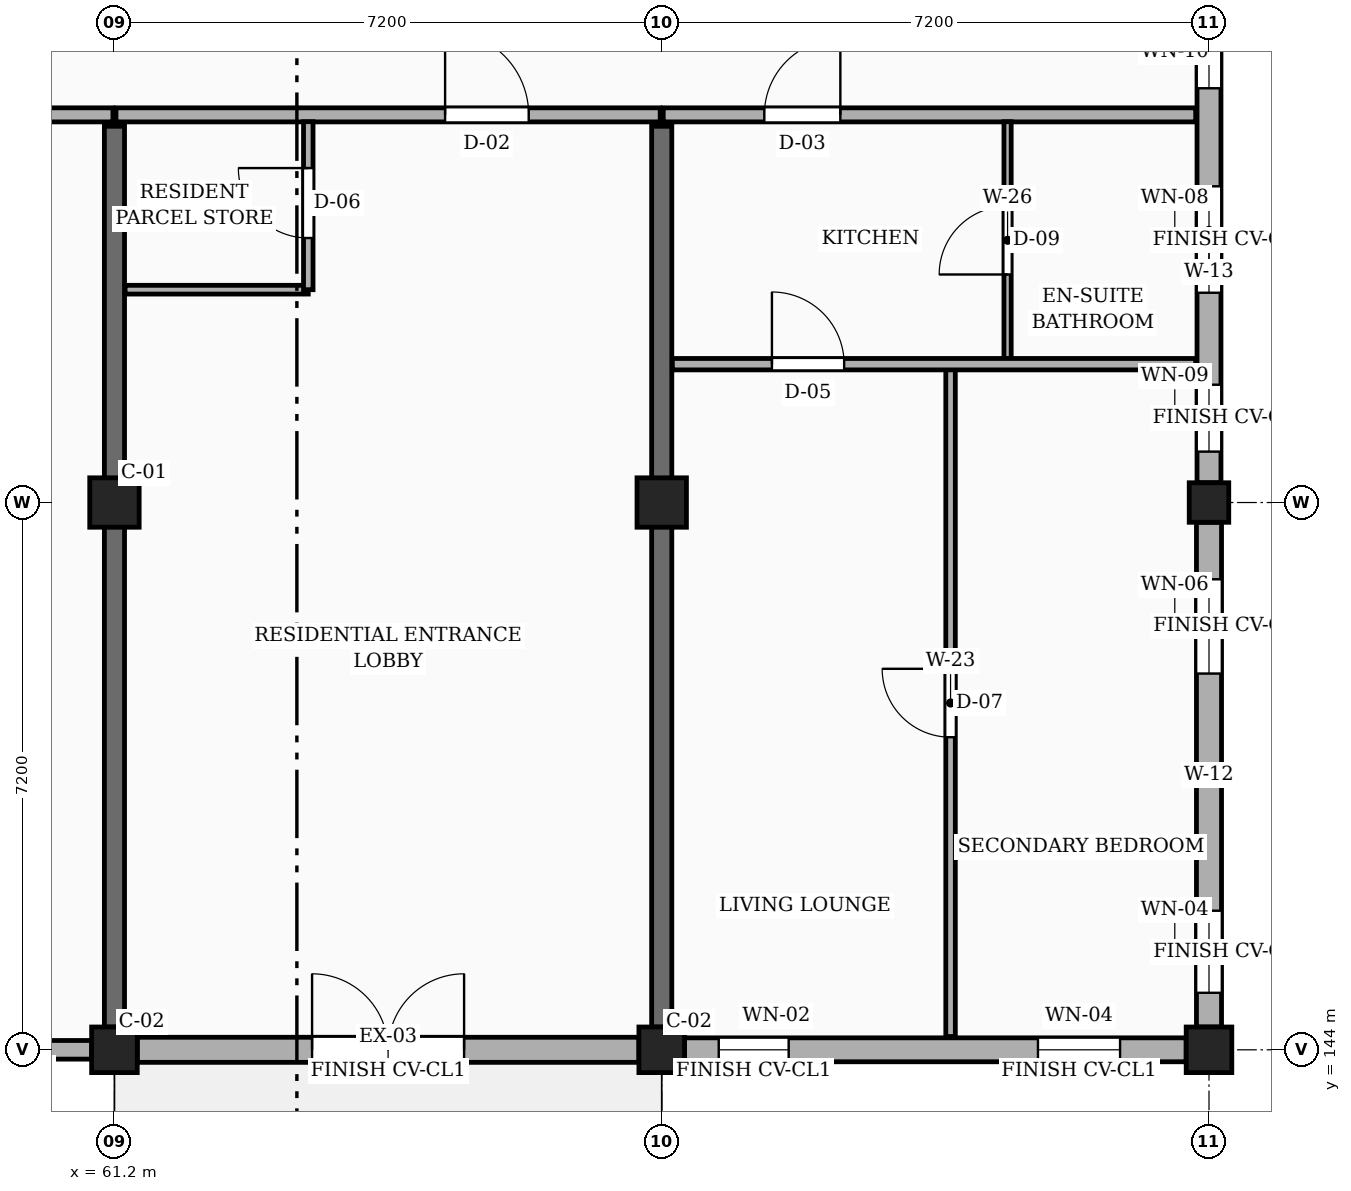
"""IFC4 building model, lengths in metres.
Left out: names, types, materials, properties, quantities, classifications, styles, units other than length and angle.
Written with IfcOpenShell. Run it as: python <this file> out.ifc"""

import sys

from ifc_helpers import new_model, si_unit, direction, frame, frame_2d, origin, origin_2d, place, context, subcontext, project, spatial, rectangle, circle, extrude, element, fill, save


model = new_model("IFC4")
c1 = context("Model", 3, precision=1e-05, world=origin(), true_north=direction((0.0, 1.0)))
c2 = subcontext(c1, "Body", "Model", "MODEL_VIEW")
j1 = project(units=[si_unit("LENGTHUNIT", "METRE"), si_unit("PLANEANGLEUNIT", "RADIAN")], contexts=[c1])
p1 = place(None, origin())
s1 = spatial("IfcSite", under=j1, at=p1, CompositionType="ELEMENT")
p2 = place(p1, origin())
s2 = spatial("IfcBuilding", under=s1, at=p2, CompositionType="ELEMENT")
p3 = place(p2, origin())
s3 = spatial("IfcBuildingStorey", under=s2, at=p3, CompositionType="ELEMENT", Elevation=0.0)
p4 = place(p3, frame((61.2, 144.0, 0.0), z_axis=(0.0, 0.0, 1.0), x_axis=(1.0, 0.0, 0.0)))
e1 = element("IfcColumn", 1, at=p4, inside=s3, PredefinedType="COLUMN", context=c2, shape_type="SweptSolid", body=[
    extrude(rectangle(XDim=0.6, YDim=0.6, at=origin_2d()), origin(), (0.0, 0.0, 1.0), 4.5),
])
p5 = place(p3, frame((61.2, 151.2, 0.0), z_axis=(0.0, 0.0, 1.0), x_axis=(1.0, 0.0, 0.0)))
e2 = element("IfcColumn", 2, at=p5, inside=s3, PredefinedType="COLUMN", context=c2, shape_type="SweptSolid", body=[
    extrude(rectangle(XDim=0.65, YDim=0.65, at=origin_2d()), origin(), (0.0, 0.0, 1.0), 4.5),
])
p6 = place(p3, frame((68.4, 144.0, 0.0), z_axis=(0.0, 0.0, 1.0), x_axis=(1.0, 0.0, 0.0)))
e3 = element("IfcColumn", 3, at=p6, inside=s3, PredefinedType="COLUMN", context=c2, shape_type="SweptSolid", body=[
    extrude(rectangle(XDim=0.6, YDim=0.6, at=origin_2d()), origin(), (0.0, 0.0, 1.0), 4.5),
])
p7 = place(p3, frame((68.4, 151.2, 0.0), z_axis=(0.0, 0.0, 1.0), x_axis=(1.0, 0.0, 0.0)))
e4 = element("IfcColumn", 4, at=p7, inside=s3, PredefinedType="COLUMN", context=c2, shape_type="SweptSolid", body=[
    extrude(rectangle(XDim=0.65, YDim=0.65, at=origin_2d()), origin(), (0.0, 0.0, 1.0), 4.5),
])
p8 = place(p3, frame((75.6, 144.0, 0.0), z_axis=(0.0, 0.0, 1.0), x_axis=(1.0, 0.0, 0.0)))
e5 = element("IfcColumn", 5, at=p8, inside=s3, PredefinedType="COLUMN", context=c2, shape_type="SweptSolid", body=[
    extrude(rectangle(XDim=0.6, YDim=0.6, at=origin_2d()), origin(), (0.0, 0.0, 1.0), 4.5),
])
p9 = place(p3, frame((75.6, 151.2, 0.0), z_axis=(0.0, 0.0, 1.0), x_axis=(1.0, 0.0, 0.0)))
e6 = element("IfcColumn", 6, at=p9, inside=s3, PredefinedType="COLUMN", context=c2, shape_type="SweptSolid", body=[
    extrude(circle(Radius=0.26, at=origin_2d()), origin(), (0.0, 0.0, 1.0), 4.5),
])
for number, where, z_axis, x_axis in (
    (7, (61.2, 144.3, 0.0), (0.0, 0.0, 1.0), (0.0, 1.0, 0.0)),
    (8, (68.4, 144.3, 0.0), (0.0, 0.0, 1.0), (0.0, 1.0, 0.0)),
):
    element("IfcWall", number, at=place(p3, frame(where, z_axis=z_axis, x_axis=x_axis)), inside=s3, PredefinedType="SOLIDWALL", context=c2, shape_type="SweptSolid", body=[
        extrude(rectangle(XDim=11.85, YDim=0.265, at=frame_2d((5.925, 0.0))), origin(), (0.0, 0.0, 1.0), 3.535),
    ])
p10 = place(p3, frame((54.26, 144.0, 0.0), z_axis=(0.0, 0.0, 1.0), x_axis=(1.0, 0.0, 0.0)))
e9 = element("IfcWall", 9, at=p10, inside=s3, PredefinedType="SOLIDWALL", context=c2, shape_type="SweptSolid", body=[
    extrude(rectangle(XDim=6.64, YDim=0.245, at=frame_2d((3.32, 0.0))), origin(), (0.0, 0.0, 1.0), 3.805),
])
p11 = place(p10, frame((0.45, 0.0, 0.78)))
e10 = element("IfcOpeningElement", 10, at=p11, cuts=e9, PredefinedType="OPENING", context=c2, shape_type="SweptSolid", body=[
    extrude(rectangle(XDim=1.45, YDim=1.44, at=frame_2d((0.725, 0.72))), frame((0.0, 0.133, 0.0), z_axis=(0.0, -1.0, 0.0), x_axis=(1.0, 0.0, 0.0)), (0.0, 0.0, 1.0), 0.265),
])
p12 = place(p10, frame((4.65, 0.0, 0.78)))
e11 = element("IfcOpeningElement", 11, at=p12, cuts=e9, PredefinedType="OPENING", context=c2, shape_type="SweptSolid", body=[
    extrude(rectangle(XDim=0.92, YDim=1.15, at=frame_2d((0.46, 0.575))), frame((0.0, 0.133, 0.0), z_axis=(0.0, -1.0, 0.0), x_axis=(1.0, 0.0, 0.0)), (0.0, 0.0, 1.0), 0.265),
])
p13 = place(p3, frame((61.5, 144.0, 0.0), z_axis=(0.0, 0.0, 1.0), x_axis=(1.0, 0.0, 0.0)))
e12 = element("IfcWall", 12, at=p13, inside=s3, PredefinedType="SOLIDWALL", context=c2, shape_type="SweptSolid", body=[
    extrude(rectangle(XDim=6.6, YDim=0.33, at=frame_2d((3.3, 0.0))), origin(), (0.0, 0.0, 1.0), 3.805),
])
p14 = place(p13, frame((2.3, 0.0, 0.0)))
e13 = element("IfcOpeningElement", 13, at=p14, cuts=e12, PredefinedType="OPENING", context=c2, shape_type="SweptSolid", body=[
    extrude(rectangle(XDim=2.0, YDim=2.3, at=frame_2d((1.0, 1.15))), frame((0.0, 0.175, 0.0), z_axis=(0.0, -1.0, 0.0), x_axis=(1.0, 0.0, 0.0)), (0.0, 0.0, 1.0), 0.35),
])
p15 = place(p3, frame((68.7, 144.0, 0.0), z_axis=(0.0, 0.0, 1.0), x_axis=(1.0, 0.0, 0.0)))
e14 = element("IfcWall", 14, at=p15, inside=s3, PredefinedType="SOLIDWALL", context=c2, shape_type="SweptSolid", body=[
    extrude(rectangle(XDim=6.6, YDim=0.315, at=frame_2d((3.3, 0.0))), origin(), (0.0, 0.0, 1.0), 3.805),
])
p16 = place(p15, frame((0.45, 0.0, 0.78)))
e15 = element("IfcOpeningElement", 15, at=p16, cuts=e14, PredefinedType="OPENING", context=c2, shape_type="SweptSolid", body=[
    extrude(rectangle(XDim=0.92, YDim=1.15, at=frame_2d((0.46, 0.575))), frame((0.0, 0.167, 0.0), z_axis=(0.0, -1.0, 0.0), x_axis=(1.0, 0.0, 0.0)), (0.0, 0.0, 1.0), 0.335),
])
p17 = place(p15, frame((4.65, 0.0, 0.78)))
e16 = element("IfcOpeningElement", 16, at=p17, cuts=e14, PredefinedType="OPENING", context=c2, shape_type="SweptSolid", body=[
    extrude(rectangle(XDim=1.08, YDim=1.15, at=frame_2d((0.54, 0.575))), frame((0.0, 0.167, 0.0), z_axis=(0.0, -1.0, 0.0), x_axis=(1.0, 0.0, 0.0)), (0.0, 0.0, 1.0), 0.335),
])
p18 = place(p3, frame((75.6, 144.3, 0.0), z_axis=(0.0, 0.0, 1.0), x_axis=(0.0, 1.0, 0.0)))
e17 = element("IfcWall", 17, at=p18, inside=s3, PredefinedType="SOLIDWALL", context=c2, shape_type="SweptSolid", body=[
    extrude(rectangle(XDim=6.64, YDim=0.33, at=frame_2d((3.32, 0.0))), origin(), (0.0, 0.0, 1.0), 3.805),
])
p19 = place(p18, frame((0.45, 0.0, 0.78)))
e18 = element("IfcOpeningElement", 18, at=p19, cuts=e17, PredefinedType="OPENING", context=c2, shape_type="SweptSolid", body=[
    extrude(rectangle(XDim=1.08, YDim=1.15, at=frame_2d((0.54, 0.575))), frame((0.0, 0.175, 0.0), z_axis=(0.0, -1.0, 0.0), x_axis=(1.0, 0.0, 0.0)), (0.0, 0.0, 1.0), 0.35),
])
p20 = place(p18, frame((4.65, 0.0, 0.78)))
e19 = element("IfcOpeningElement", 19, at=p20, cuts=e17, PredefinedType="OPENING", context=c2, shape_type="SweptSolid", body=[
    extrude(rectangle(XDim=1.24, YDim=1.15, at=frame_2d((0.62, 0.575))), frame((0.0, 0.175, 0.0), z_axis=(0.0, -1.0, 0.0), x_axis=(1.0, 0.0, 0.0)), (0.0, 0.0, 1.0), 0.35),
])
p21 = place(p3, frame((75.6, 151.46, 0.0), z_axis=(0.0, 0.0, 1.0), x_axis=(0.0, 1.0, 0.0)))
e20 = element("IfcWall", 20, at=p21, inside=s3, PredefinedType="SOLIDWALL", context=c2, shape_type="SweptSolid", body=[
    extrude(rectangle(XDim=6.64, YDim=0.315, at=frame_2d((3.32, 0.0))), origin(), (0.0, 0.0, 1.0), 3.805),
])
p22 = place(p21, frame((0.41, 0.0, 0.78)))
e21 = element("IfcOpeningElement", 21, at=p22, cuts=e20, PredefinedType="OPENING", context=c2, shape_type="SweptSolid", body=[
    extrude(rectangle(XDim=0.88, YDim=1.26, at=frame_2d((0.44, 0.63))), frame((0.0, 0.167, 0.0), z_axis=(0.0, -1.0, 0.0), x_axis=(1.0, 0.0, 0.0)), (0.0, 0.0, 1.0), 0.335),
])
p23 = place(p21, frame((2.5, 0.0, 0.78)))
e22 = element("IfcOpeningElement", 22, at=p23, cuts=e20, PredefinedType="OPENING", context=c2, shape_type="SweptSolid", body=[
    extrude(rectangle(XDim=1.4, YDim=1.15, at=frame_2d((0.7, 0.575))), frame((0.0, 0.167, 0.0), z_axis=(0.0, -1.0, 0.0), x_axis=(1.0, 0.0, 0.0)), (0.0, 0.0, 1.0), 0.335),
])
p24 = place(p21, frame((5.19, 0.0, 0.78)))
e23 = element("IfcOpeningElement", 23, at=p24, cuts=e20, PredefinedType="OPENING", context=c2, shape_type="SweptSolid", body=[
    extrude(rectangle(XDim=0.96, YDim=1.26, at=frame_2d((0.48, 0.63))), frame((0.0, 0.167, 0.0), z_axis=(0.0, -1.0, 0.0), x_axis=(1.0, 0.0, 0.0)), (0.0, 0.0, 1.0), 0.335),
])
p25 = place(p3, frame((54.02, 156.3, 0.0), z_axis=(0.0, 0.0, 1.0), x_axis=(1.0, 0.0, 0.0)))
e24 = element("IfcWall", 24, at=p25, inside=s3, PredefinedType="PARTITIONING", context=c2, shape_type="SweptSolid", body=[
    extrude(rectangle(XDim=7.16, YDim=0.185, at=frame_2d((3.58, 0.0))), origin(), (0.0, 0.0, 1.0), 3.67),
])
p26 = place(p25, frame((1.78, 0.0, 0.0)))
e25 = element("IfcOpeningElement", 25, at=p26, cuts=e24, PredefinedType="OPENING", context=c2, shape_type="SweptSolid", body=[
    extrude(rectangle(XDim=1.1, YDim=2.15, at=frame_2d((0.55, 1.075))), frame((0.0, 0.103, 0.0), z_axis=(0.0, -1.0, 0.0), x_axis=(1.0, 0.0, 0.0)), (0.0, 0.0, 1.0), 0.205),
])
p27 = place(p3, frame((61.22, 156.3, 0.0), z_axis=(0.0, 0.0, 1.0), x_axis=(1.0, 0.0, 0.0)))
e26 = element("IfcWall", 26, at=p27, inside=s3, PredefinedType="PARTITIONING", context=c2, shape_type="SweptSolid", body=[
    extrude(rectangle(XDim=7.16, YDim=0.185, at=frame_2d((3.58, 0.0))), origin(), (0.0, 0.0, 1.0), 3.67),
])
p28 = place(p27, frame((4.33, 0.0, 0.0)))
e27 = element("IfcOpeningElement", 27, at=p28, cuts=e26, PredefinedType="OPENING", context=c2, shape_type="SweptSolid", body=[
    extrude(rectangle(XDim=1.1, YDim=2.15, at=frame_2d((0.55, 1.075))), frame((0.0, 0.103, 0.0), z_axis=(0.0, -1.0, 0.0), x_axis=(1.0, 0.0, 0.0)), (0.0, 0.0, 1.0), 0.205),
])
p29 = place(p3, frame((68.42, 156.3, 0.0), z_axis=(0.0, 0.0, 1.0), x_axis=(1.0, 0.0, 0.0)))
e28 = element("IfcWall", 28, at=p29, inside=s3, PredefinedType="PARTITIONING", context=c2, shape_type="SweptSolid", body=[
    extrude(rectangle(XDim=7.005, YDim=0.185, at=frame_2d((3.502, 0.0))), origin(), (0.0, 0.0, 1.0), 3.67),
])
p30 = place(p29, frame((1.33, 0.0, 0.0)))
e29 = element("IfcOpeningElement", 29, at=p30, cuts=e28, PredefinedType="OPENING", context=c2, shape_type="SweptSolid", body=[
    extrude(rectangle(XDim=1.0, YDim=2.15, at=frame_2d((0.5, 1.075))), frame((0.0, 0.103, 0.0), z_axis=(0.0, -1.0, 0.0), x_axis=(1.0, 0.0, 0.0)), (0.0, 0.0, 1.0), 0.205),
])
p31 = place(p3, frame((61.34, 154.0, 0.0), z_axis=(0.0, 0.0, 1.0), x_axis=(1.0, 0.0, 0.0)))
e30 = element("IfcWall", 30, at=p31, inside=s3, PredefinedType="PARTITIONING", context=c2, shape_type="SweptSolid", body=[
    extrude(rectangle(XDim=2.41, YDim=0.115, at=frame_2d((1.205, 0.0))), origin(), (0.0, 0.0, 1.0), 3.67),
])
p32 = place(p3, frame((63.75, 154.0, 0.0), z_axis=(0.0, 0.0, 1.0), x_axis=(0.0, 1.0, 0.0)))
e31 = element("IfcWall", 31, at=p32, inside=s3, PredefinedType="PARTITIONING", context=c2, shape_type="SweptSolid", body=[
    extrude(rectangle(XDim=2.21, YDim=0.125, at=frame_2d((1.105, 0.0))), origin(), (0.0, 0.0, 1.0), 3.67),
])
p33 = place(p32, frame((0.68, 0.0, 0.0)))
e32 = element("IfcOpeningElement", 32, at=p33, cuts=e31, PredefinedType="OPENING", context=c2, shape_type="SweptSolid", body=[
    extrude(rectangle(XDim=0.92, YDim=2.1, at=frame_2d((0.46, 1.05))), frame((0.0, 0.073, 0.0), z_axis=(0.0, -1.0, 0.0), x_axis=(1.0, 0.0, 0.0)), (0.0, 0.0, 1.0), 0.145),
])
p34 = place(p3, frame((72.2, 144.175, 0.0), z_axis=(0.0, 0.0, 1.0), x_axis=(0.0, 1.0, 0.0)))
e33 = element("IfcWall", 33, at=p34, inside=s3, PredefinedType="PARTITIONING", context=c2, shape_type="SweptSolid", body=[
    extrude(rectangle(XDim=8.775, YDim=0.125, at=frame_2d((4.387, 0.0))), origin(), (0.0, 0.0, 1.0), 3.67),
])
p35 = place(p34, frame((3.938, 0.0, 0.0)))
e34 = element("IfcOpeningElement", 34, at=p35, cuts=e33, PredefinedType="OPENING", context=c2, shape_type="SweptSolid", body=[
    extrude(rectangle(XDim=0.9, YDim=2.1, at=frame_2d((0.45, 1.05))), frame((0.0, 0.073, 0.0), z_axis=(0.0, -1.0, 0.0), x_axis=(1.0, 0.0, 0.0)), (0.0, 0.0, 1.0), 0.145),
])
p36 = place(p3, frame((72.95, 153.09, 0.0), z_axis=(0.0, 0.0, 1.0), x_axis=(0.0, 1.0, 0.0)))
e35 = element("IfcWall", 35, at=p36, inside=s3, PredefinedType="PARTITIONING", context=c2, shape_type="SweptSolid", body=[
    extrude(rectangle(XDim=3.12, YDim=0.095, at=frame_2d((1.56, 0.0))), origin(), (0.0, 0.0, 1.0), 3.67),
])
p37 = place(p36, frame((1.11, 0.0, 0.0)))
e36 = element("IfcOpeningElement", 36, at=p37, cuts=e35, PredefinedType="OPENING", context=c2, shape_type="SweptSolid", body=[
    extrude(rectangle(XDim=0.9, YDim=2.05, at=frame_2d((0.45, 1.025))), frame((0.0, 0.058, 0.0), z_axis=(0.0, -1.0, 0.0), x_axis=(1.0, 0.0, 0.0)), (0.0, 0.0, 1.0), 0.115),
])
p38 = place(p3, frame((68.54, 153.02, 0.0), z_axis=(0.0, 0.0, 1.0), x_axis=(1.0, 0.0, 0.0)))
e37 = element("IfcWall", 37, at=p38, inside=s3, PredefinedType="PARTITIONING", context=c2, shape_type="SweptSolid", body=[
    extrude(rectangle(XDim=6.885, YDim=0.15, at=frame_2d((3.442, 0.0))), origin(), (0.0, 0.0, 1.0), 3.67),
])
p39 = place(p38, frame((1.31, 0.0, 0.0)))
e38 = element("IfcOpeningElement", 38, at=p39, cuts=e37, PredefinedType="OPENING", context=c2, shape_type="SweptSolid", body=[
    extrude(rectangle(XDim=0.95, YDim=2.1, at=frame_2d((0.475, 1.05))), frame((0.0, 0.085, 0.0), z_axis=(0.0, -1.0, 0.0), x_axis=(1.0, 0.0, 0.0)), (0.0, 0.0, 1.0), 0.17),
])
p40 = place(p14, frame((2.0, 0.0, 0.0), z_axis=(0.0, 0.0, 1.0), x_axis=(-1.0, 0.0, 0.0)))
e39 = element("IfcDoor", 39, at=p40, inside=s3, OperationType="DOUBLE_DOOR_SINGLE_SWING", PredefinedType="DOOR", context=c2, shape_type="SweptSolid", body=[
    extrude(rectangle(XDim=2.0, YDim=2.3, at=frame_2d((1.0, 1.15))), frame((0.0, 0.025, 0.0), z_axis=(0.0, -1.0, 0.0), x_axis=(1.0, 0.0, 0.0)), (0.0, 0.0, 1.0), 0.05),
])
fill(e13, e39)
p41 = place(p16, origin())
e40 = element("IfcWindow", 40, at=p41, inside=s3, PartitioningType="SINGLE_PANEL", PredefinedType="WINDOW", context=c2, shape_type="SweptSolid", body=[
    extrude(rectangle(XDim=0.92, YDim=1.15, at=frame_2d((0.46, 0.575))), frame((0.0, 0.03, 0.0), z_axis=(0.0, -1.0, 0.0), x_axis=(1.0, 0.0, 0.0)), (0.0, 0.0, 1.0), 0.06),
])
fill(e15, e40)
p42 = place(p17, origin())
e41 = element("IfcWindow", 41, at=p42, inside=s3, PartitioningType="SINGLE_PANEL", PredefinedType="WINDOW", context=c2, shape_type="SweptSolid", body=[
    extrude(rectangle(XDim=1.08, YDim=1.15, at=frame_2d((0.54, 0.575))), frame((0.0, 0.03, 0.0), z_axis=(0.0, -1.0, 0.0), x_axis=(1.0, 0.0, 0.0)), (0.0, 0.0, 1.0), 0.06),
])
fill(e16, e41)
p43 = place(p19, origin())
e42 = element("IfcWindow", 42, at=p43, inside=s3, PartitioningType="SINGLE_PANEL", PredefinedType="WINDOW", context=c2, shape_type="SweptSolid", body=[
    extrude(rectangle(XDim=1.08, YDim=1.15, at=frame_2d((0.54, 0.575))), frame((0.0, 0.03, 0.0), z_axis=(0.0, -1.0, 0.0), x_axis=(1.0, 0.0, 0.0)), (0.0, 0.0, 1.0), 0.06),
])
fill(e18, e42)
p44 = place(p20, origin())
e43 = element("IfcWindow", 43, at=p44, inside=s3, PartitioningType="SINGLE_PANEL", PredefinedType="WINDOW", context=c2, shape_type="SweptSolid", body=[
    extrude(rectangle(XDim=1.24, YDim=1.15, at=frame_2d((0.62, 0.575))), frame((0.0, 0.03, 0.0), z_axis=(0.0, -1.0, 0.0), x_axis=(1.0, 0.0, 0.0)), (0.0, 0.0, 1.0), 0.06),
])
fill(e19, e43)
p45 = place(p22, origin())
e44 = element("IfcWindow", 44, at=p45, inside=s3, PartitioningType="SINGLE_PANEL", PredefinedType="WINDOW", context=c2, shape_type="SweptSolid", body=[
    extrude(rectangle(XDim=0.88, YDim=1.26, at=frame_2d((0.44, 0.63))), frame((0.0, 0.03, 0.0), z_axis=(0.0, -1.0, 0.0), x_axis=(1.0, 0.0, 0.0)), (0.0, 0.0, 1.0), 0.06),
])
fill(e21, e44)
p46 = place(p23, origin())
e45 = element("IfcWindow", 45, at=p46, inside=s3, PartitioningType="SINGLE_PANEL", PredefinedType="WINDOW", context=c2, shape_type="SweptSolid", body=[
    extrude(rectangle(XDim=1.4, YDim=1.15, at=frame_2d((0.7, 0.575))), frame((0.0, 0.03, 0.0), z_axis=(0.0, -1.0, 0.0), x_axis=(1.0, 0.0, 0.0)), (0.0, 0.0, 1.0), 0.06),
])
fill(e22, e45)
p47 = place(p24, origin())
e46 = element("IfcWindow", 46, at=p47, inside=s3, PartitioningType="SINGLE_PANEL", PredefinedType="WINDOW", context=c2, shape_type="SweptSolid", body=[
    extrude(rectangle(XDim=0.96, YDim=1.26, at=frame_2d((0.48, 0.63))), frame((0.0, 0.03, 0.0), z_axis=(0.0, -1.0, 0.0), x_axis=(1.0, 0.0, 0.0)), (0.0, 0.0, 1.0), 0.06),
])
fill(e23, e46)
p48 = place(p28, origin())
e47 = element("IfcDoor", 47, at=p48, inside=s3, OperationType="SINGLE_SWING_LEFT", PredefinedType="DOOR", context=c2, shape_type="SweptSolid", body=[
    extrude(rectangle(XDim=1.1, YDim=2.15, at=frame_2d((0.55, 1.075))), frame((0.0, 0.025, 0.0), z_axis=(0.0, -1.0, 0.0), x_axis=(1.0, 0.0, 0.0)), (0.0, 0.0, 1.0), 0.05),
])
fill(e27, e47)
p49 = place(p30, origin())
e48 = element("IfcDoor", 48, at=p49, inside=s3, OperationType="SINGLE_SWING_RIGHT", PredefinedType="DOOR", context=c2, shape_type="SweptSolid", body=[
    extrude(rectangle(XDim=1.0, YDim=2.15, at=frame_2d((0.5, 1.075))), frame((0.0, 0.025, 0.0), z_axis=(0.0, -1.0, 0.0), x_axis=(1.0, 0.0, 0.0)), (0.0, 0.0, 1.0), 0.05),
])
fill(e29, e48)
p50 = place(p33, origin())
e49 = element("IfcDoor", 49, at=p50, inside=s3, OperationType="SINGLE_SWING_RIGHT", PredefinedType="DOOR", context=c2, shape_type="SweptSolid", body=[
    extrude(rectangle(XDim=0.92, YDim=2.1, at=frame_2d((0.46, 1.05))), frame((0.0, 0.025, 0.0), z_axis=(0.0, -1.0, 0.0), x_axis=(1.0, 0.0, 0.0)), (0.0, 0.0, 1.0), 0.05),
])
fill(e32, e49)
p51 = place(p35, origin())
e50 = element("IfcDoor", 50, at=p51, inside=s3, OperationType="SINGLE_SWING_RIGHT", PredefinedType="DOOR", context=c2, shape_type="SweptSolid", body=[
    extrude(rectangle(XDim=0.9, YDim=2.1, at=frame_2d((0.45, 1.05))), frame((0.0, 0.025, 0.0), z_axis=(0.0, -1.0, 0.0), x_axis=(1.0, 0.0, 0.0)), (0.0, 0.0, 1.0), 0.05),
])
fill(e34, e50)
p52 = place(p37, origin())
e51 = element("IfcDoor", 51, at=p52, inside=s3, OperationType="SINGLE_SWING_LEFT", PredefinedType="DOOR", context=c2, shape_type="SweptSolid", body=[
    extrude(rectangle(XDim=0.9, YDim=2.05, at=frame_2d((0.45, 1.025))), frame((0.0, 0.025, 0.0), z_axis=(0.0, -1.0, 0.0), x_axis=(1.0, 0.0, 0.0)), (0.0, 0.0, 1.0), 0.05),
])
fill(e36, e51)
p53 = place(p39, origin())
e52 = element("IfcDoor", 52, at=p53, inside=s3, OperationType="SINGLE_SWING_LEFT", PredefinedType="DOOR", context=c2, shape_type="SweptSolid", body=[
    extrude(rectangle(XDim=0.95, YDim=2.1, at=frame_2d((0.475, 1.05))), frame((0.0, 0.025, 0.0), z_axis=(0.0, -1.0, 0.0), x_axis=(1.0, 0.0, 0.0)), (0.0, 0.0, 1.0), 0.05),
])
fill(e38, e52)
save(model, sys.argv[1])
